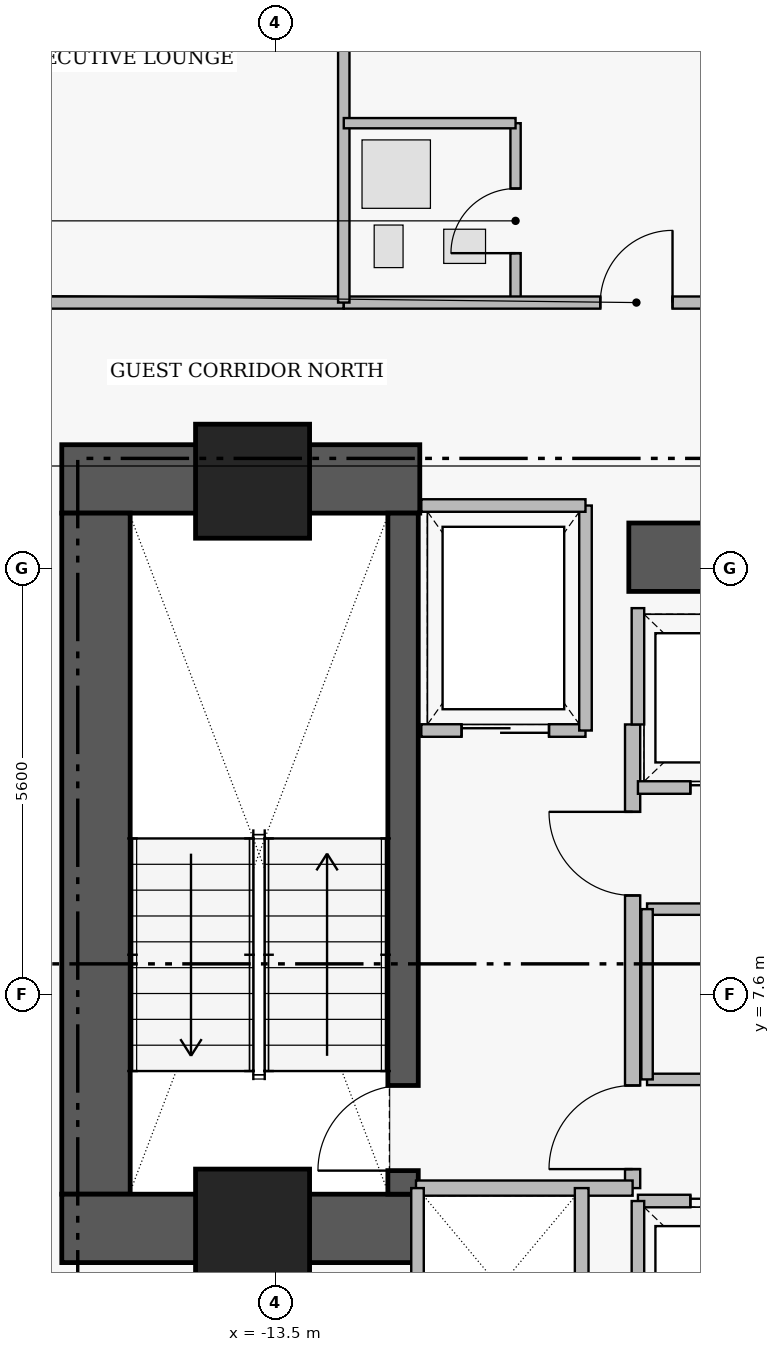
"""IFC4 building model, lengths in metres.
Left out: names, types, materials, properties, quantities, classifications, styles, units other than length and angle.
Written with IfcOpenShell. Run it as: python <this file> out.ifc"""

import sys

from ifc_helpers import new_model, si_unit, direction, frame, frame_2d, origin, origin_2d, place, context, subcontext, project, spatial, rectangle, extrude, element, fill, save


model = new_model("IFC4")
c1 = context("Model", 3, precision=1e-05, world=origin(), true_north=direction((0.0, 1.0)))
c2 = subcontext(c1, "Body", "Model", "MODEL_VIEW")
j1 = project(units=[si_unit("LENGTHUNIT", "METRE"), si_unit("PLANEANGLEUNIT", "RADIAN")], contexts=[c1])
p1 = place(None, origin())
s1 = spatial("IfcSite", under=j1, at=p1, CompositionType="ELEMENT")
p2 = place(p1, origin())
s2 = spatial("IfcBuilding", under=s1, at=p2, CompositionType="ELEMENT")
p3 = place(p2, frame((0.0, 0.0, 27.6)))
s3 = spatial("IfcBuildingStorey", under=s2, at=p3, CompositionType="ELEMENT", Elevation=27.6)
p4 = place(p3, frame((-16.31, 14.38, 0.0), z_axis=(0.0, 0.0, 1.0), x_axis=(1.0, 0.0, 0.0)))
e1 = element("IfcWall", 1, at=p4, inside=s3, PredefinedType="SHEAR", context=c2, shape_type="SweptSolid", body=[
    extrude(rectangle(XDim=4.71, YDim=0.9, at=frame_2d((2.355, 0.0))), origin(), (0.0, 0.0, 1.0), 3.46),
])
p5 = place(p3, frame((-15.86, 4.97, 0.0), z_axis=(0.0, 0.0, 1.0), x_axis=(0.0, 1.0, 0.0)))
e2 = element("IfcWall", 2, at=p5, inside=s3, PredefinedType="SHEAR", context=c2, shape_type="SweptSolid", body=[
    extrude(rectangle(XDim=8.96, YDim=0.9, at=frame_2d((4.48, 0.0))), origin(), (0.0, 0.0, 1.0), 3.46),
])
p6 = place(p3, frame((-16.31, 4.52, 0.0), z_axis=(0.0, 0.0, 1.0), x_axis=(1.0, 0.0, 0.0)))
e3 = element("IfcWall", 3, at=p6, inside=s3, PredefinedType="SHEAR", context=c2, shape_type="SweptSolid", body=[
    extrude(rectangle(XDim=4.71, YDim=0.9, at=frame_2d((2.355, 0.0))), origin(), (0.0, 0.0, 1.0), 3.46),
])
p7 = place(p3, frame((-8.85, 13.35, 0.0), z_axis=(0.0, 0.0, 1.0), x_axis=(1.0, 0.0, 0.0)))
e4 = element("IfcWall", 4, at=p7, inside=s3, PredefinedType="SHEAR", context=c2, shape_type="SweptSolid", body=[
    extrude(rectangle(XDim=7.6, YDim=0.9, at=frame_2d((3.8, 0.0))), origin(), (0.0, 0.0, 1.0), 3.43),
])
p8 = place(p3, frame((-11.82, 4.97, 0.0), z_axis=(0.0, 0.0, 1.0), x_axis=(0.0, 1.0, 0.0)))
e5 = element("IfcWall", 5, at=p8, inside=s3, PredefinedType="SHEAR", context=c2, shape_type="SweptSolid", body=[
    extrude(rectangle(XDim=8.96, YDim=0.4, at=frame_2d((4.48, 0.0))), origin(), (0.0, 0.0, 1.0), 3.46),
])
p9 = place(p8, frame((0.31, 0.0, 0.0)))
e6 = element("IfcOpeningElement", 6, at=p9, cuts=e5, PredefinedType="OPENING", context=c2, shape_type="SweptSolid", body=[
    extrude(rectangle(XDim=1.12, YDim=2.22, at=frame_2d((0.56, 1.11))), frame((0.0, 0.21, 0.0), z_axis=(0.0, -1.0, 0.0), x_axis=(1.0, 0.0, 0.0)), (0.0, 0.0, 1.0), 0.42),
])
for number, where, z_axis, x_axis in (
    (7, (-13.8, 14.35, 0.0), (0.0, 0.0, 1.0), (1.0, 0.0, 0.0)),
    (8, (-13.8, 4.55, 0.0), (0.0, 0.0, 1.0), (1.0, 0.0, 0.0)),
):
    element("IfcColumn", number, at=place(p3, frame(where, z_axis=z_axis, x_axis=x_axis)), inside=s3, PredefinedType="COLUMN", context=c2, shape_type="SweptSolid", body=[
        extrude(rectangle(XDim=1.5, YDim=1.5, at=origin_2d()), origin(), (0.0, 0.0, 1.0), 3.65),
    ])
p10 = place(p3, frame((-8.8, 5.05, 0.0), z_axis=(0.0, 0.0, 1.0), x_axis=(0.0, 1.0, 0.0)))
e9 = element("IfcWall", 9, at=p10, inside=s3, PredefinedType="PARTITIONING", context=c2, shape_type="SweptSolid", body=[
    extrude(rectangle(XDim=6.1, YDim=0.2, at=frame_2d((3.05, 0.0))), origin(), (0.0, 0.0, 1.0), 3.43),
])
p11 = place(p10, frame((0.25, 0.0, 0.0)))
e10 = element("IfcOpeningElement", 10, at=p11, cuts=e9, PredefinedType="OPENING", context=c2, shape_type="SweptSolid", body=[
    extrude(rectangle(XDim=1.1, YDim=2.2, at=frame_2d((0.55, 1.1))), frame((0.0, 0.11, 0.0), z_axis=(0.0, -1.0, 0.0), x_axis=(1.0, 0.0, 0.0)), (0.0, 0.0, 1.0), 0.22),
])
p12 = place(p10, frame((3.85, 0.0, 0.0)))
e11 = element("IfcOpeningElement", 11, at=p12, cuts=e9, PredefinedType="OPENING", context=c2, shape_type="SweptSolid", body=[
    extrude(rectangle(XDim=1.1, YDim=2.2, at=frame_2d((0.55, 1.1))), frame((0.0, 0.11, 0.0), z_axis=(0.0, -1.0, 0.0), x_axis=(1.0, 0.0, 0.0)), (0.0, 0.0, 1.0), 0.22),
])
p13 = place(p3, frame((-11.58, 11.07, 0.0), z_axis=(0.0, 0.0, 1.0), x_axis=(1.0, 0.0, 0.0)))
e12 = element("IfcWall", 12, at=p13, inside=s3, PredefinedType="PARTITIONING", context=c2, shape_type="SweptSolid", body=[
    extrude(rectangle(XDim=2.16, YDim=0.165, at=frame_2d((1.08, 0.0))), origin(), (0.0, 0.0, 1.0), 3.43),
])
p14 = place(p13, frame((0.53, 0.0, 0.0)))
e13 = element("IfcOpeningElement", 13, at=p14, cuts=e12, PredefinedType="OPENING", context=c2, shape_type="SweptSolid", body=[
    extrude(rectangle(XDim=1.15, YDim=2.25, at=frame_2d((0.575, 1.125))), frame((0.0, 0.093, 0.0), z_axis=(0.0, -1.0, 0.0), x_axis=(1.0, 0.0, 0.0)), (0.0, 0.0, 1.0), 0.185),
])
p15 = place(p3, frame((-8.73, 4.88, 0.0), z_axis=(0.0, 0.0, 1.0), x_axis=(1.0, 0.0, 0.0)))
e14 = element("IfcWall", 14, at=p15, inside=s3, PredefinedType="PARTITIONING", context=c2, shape_type="SweptSolid", body=[
    extrude(rectangle(XDim=2.48, YDim=0.165, at=frame_2d((1.24, 0.0))), origin(), (0.0, 0.0, 1.0), 3.43),
])
p16 = place(p15, frame((0.69, 0.0, 0.0)))
e15 = element("IfcOpeningElement", 15, at=p16, cuts=e14, PredefinedType="OPENING", context=c2, shape_type="SweptSolid", body=[
    extrude(rectangle(XDim=1.1, YDim=2.25, at=frame_2d((0.55, 1.125))), frame((0.0, 0.093, 0.0), z_axis=(0.0, -1.0, 0.0), x_axis=(1.0, 0.0, 0.0)), (0.0, 0.0, 1.0), 0.185),
])
p17 = place(p3, frame((-8.73, 10.32, 0.0), z_axis=(0.0, 0.0, 1.0), x_axis=(1.0, 0.0, 0.0)))
e16 = element("IfcWall", 16, at=p17, inside=s3, PredefinedType="PARTITIONING", context=c2, shape_type="SweptSolid", body=[
    extrude(rectangle(XDim=2.48, YDim=0.165, at=frame_2d((1.24, 0.0))), origin(), (0.0, 0.0, 1.0), 3.43),
])
p18 = place(p17, frame((0.69, 0.0, 0.0)))
e17 = element("IfcOpeningElement", 17, at=p18, cuts=e16, PredefinedType="OPENING", context=c2, shape_type="SweptSolid", body=[
    extrude(rectangle(XDim=1.1, YDim=2.25, at=frame_2d((0.55, 1.125))), frame((0.0, 0.093, 0.0), z_axis=(0.0, -1.0, 0.0), x_axis=(1.0, 0.0, 0.0)), (0.0, 0.0, 1.0), 0.185),
])
p19 = place(p3, frame((-8.61, 8.72, 0.0), z_axis=(0.0, 0.0, 1.0), x_axis=(1.0, 0.0, 0.0)))
e18 = element("IfcWall", 18, at=p19, inside=s3, PredefinedType="PARTITIONING", context=c2, shape_type="SweptSolid", body=[
    extrude(rectangle(XDim=2.92, YDim=0.15, at=frame_2d((1.46, 0.0))), origin(), (0.0, 0.0, 1.0), 3.43),
])
p20 = place(p19, frame((1.01, 0.0, 0.0)))
e19 = element("IfcOpeningElement", 19, at=p20, cuts=e18, PredefinedType="OPENING", context=c2, shape_type="SweptSolid", body=[
    extrude(rectangle(XDim=0.9, YDim=2.15, at=frame_2d((0.45, 1.075))), frame((0.0, 0.085, 0.0), z_axis=(0.0, -1.0, 0.0), x_axis=(1.0, 0.0, 0.0)), (0.0, 0.0, 1.0), 0.17),
])
p21 = place(p3, frame((-25.64, 16.7, 0.0), z_axis=(0.0, 0.0, 1.0), x_axis=(1.0, 0.0, 0.0)))
e20 = element("IfcWall", 20, at=p21, inside=s3, PredefinedType="PARTITIONING", context=c2, shape_type="SweptSolid", body=[
    extrude(rectangle(XDim=13.04, YDim=0.16, at=frame_2d((6.52, 0.0))), origin(), (0.0, 0.0, 1.0), 2.973),
])
p22 = place(p21, frame((5.98, 0.0, 0.0)))
e21 = element("IfcOpeningElement", 21, at=p22, cuts=e20, PredefinedType="OPENING", context=c2, shape_type="SweptSolid", body=[
    extrude(rectangle(XDim=1.08, YDim=2.18, at=frame_2d((0.54, 1.09))), frame((0.0, 0.09, 0.0), z_axis=(0.0, -1.0, 0.0), x_axis=(1.0, 0.0, 0.0)), (0.0, 0.0, 1.0), 0.18),
])
p23 = place(p3, frame((-10.34, 16.7, 0.0), z_axis=(0.0, 0.0, 1.0), x_axis=(0.0, 1.0, 0.0)))
e22 = element("IfcWall", 22, at=p23, inside=s3, PredefinedType="PLUMBINGWALL", context=c2, shape_type="SweptSolid", body=[
    extrude(rectangle(XDim=2.36, YDim=0.135, at=frame_2d((1.18, 0.0))), origin(), (0.0, 0.0, 1.0), 3.43),
])
p24 = place(p23, frame((0.65, 0.0, 0.0)))
e23 = element("IfcOpeningElement", 23, at=p24, cuts=e22, PredefinedType="OPENING", context=c2, shape_type="SweptSolid", body=[
    extrude(rectangle(XDim=0.85, YDim=2.1, at=frame_2d((0.425, 1.05))), frame((0.0, 0.077, 0.0), z_axis=(0.0, -1.0, 0.0), x_axis=(1.0, 0.0, 0.0)), (0.0, 0.0, 1.0), 0.155),
])
p25 = place(p3, frame((-12.6, 16.7, 0.0), z_axis=(0.0, 0.0, 1.0), x_axis=(1.0, 0.0, 0.0)))
e24 = element("IfcWall", 24, at=p25, inside=s3, PredefinedType="PARTITIONING", context=c2, shape_type="SweptSolid", body=[
    extrude(rectangle(XDim=5.4, YDim=0.16, at=frame_2d((2.7, 0.0))), origin(), (0.0, 0.0, 1.0), 2.973),
])
p26 = place(p25, frame((3.375, 0.0, 0.0)))
e25 = element("IfcOpeningElement", 25, at=p26, cuts=e24, PredefinedType="OPENING", context=c2, shape_type="SweptSolid", body=[
    extrude(rectangle(XDim=0.95, YDim=2.15, at=frame_2d((0.475, 1.075))), frame((0.0, 0.09, 0.0), z_axis=(0.0, -1.0, 0.0), x_axis=(1.0, 0.0, 0.0)), (0.0, 0.0, 1.0), 0.18),
])
p27 = place(p3, frame((-11.65, 5.05, 0.0), z_axis=(0.0, 0.0, 1.0), x_axis=(1.0, 0.0, 0.0)))
e26 = element("IfcWall", 26, at=p27, inside=s3, PredefinedType="PARTITIONING", context=c2, shape_type="SweptSolid", body=[
    extrude(rectangle(XDim=2.85, YDim=0.2, at=frame_2d((1.425, 0.0))), origin(), (0.0, 0.0, 1.0), 3.43),
])
p28 = place(p3, frame((-9.42, 11.07, 0.0), z_axis=(0.0, 0.0, 1.0), x_axis=(0.0, 1.0, 0.0)))
e27 = element("IfcWall", 27, at=p28, inside=s3, PredefinedType="PARTITIONING", context=c2, shape_type="SweptSolid", body=[
    extrude(rectangle(XDim=2.96, YDim=0.165, at=frame_2d((1.48, 0.0))), origin(), (0.0, 0.0, 1.0), 3.43),
])
p29 = place(p3, frame((-11.58, 14.03, 0.0), z_axis=(0.0, 0.0, 1.0), x_axis=(1.0, 0.0, 0.0)))
e28 = element("IfcWall", 28, at=p29, inside=s3, PredefinedType="PARTITIONING", context=c2, shape_type="SweptSolid", body=[
    extrude(rectangle(XDim=2.16, YDim=0.165, at=frame_2d((1.08, 0.0))), origin(), (0.0, 0.0, 1.0), 3.43),
])
p30 = place(p3, frame((-8.73, 2.52, 0.0), z_axis=(0.0, 0.0, 1.0), x_axis=(0.0, 1.0, 0.0)))
e29 = element("IfcWall", 29, at=p30, inside=s3, PredefinedType="PARTITIONING", context=c2, shape_type="SweptSolid", body=[
    extrude(rectangle(XDim=2.36, YDim=0.165, at=frame_2d((1.18, 0.0))), origin(), (0.0, 0.0, 1.0), 3.43),
])
p31 = place(p3, frame((-8.73, 11.15, 0.0), z_axis=(0.0, 0.0, 1.0), x_axis=(0.0, 1.0, 0.0)))
e30 = element("IfcWall", 30, at=p31, inside=s3, PredefinedType="PARTITIONING", context=c2, shape_type="SweptSolid", body=[
    extrude(rectangle(XDim=1.53, YDim=0.165, at=frame_2d((0.765, 0.0))), origin(), (0.0, 0.0, 1.0), 3.43),
])
p32 = place(p3, frame((-9.47, 2.45, 0.0), z_axis=(0.0, 0.0, 1.0), x_axis=(0.0, 1.0, 0.0)))
e31 = element("IfcWall", 31, at=p32, inside=s3, PredefinedType="PARTITIONING", context=c2, shape_type="SweptSolid", body=[
    extrude(rectangle(XDim=2.6, YDim=0.18, at=frame_2d((1.3, 0.0))), origin(), (0.0, 0.0, 1.0), 3.43),
])
p33 = place(p3, frame((-11.63, 2.47, 0.0), z_axis=(0.0, 0.0, 1.0), x_axis=(0.0, 1.0, 0.0)))
e32 = element("IfcWall", 32, at=p33, inside=s3, PredefinedType="PARTITIONING", context=c2, shape_type="SweptSolid", body=[
    extrude(rectangle(XDim=2.58, YDim=0.165, at=frame_2d((1.29, 0.0))), origin(), (0.0, 0.0, 1.0), 3.43),
])
p34 = place(p3, frame((-8.61, 6.48, 0.0), z_axis=(0.0, 0.0, 1.0), x_axis=(1.0, 0.0, 0.0)))
e33 = element("IfcWall", 33, at=p34, inside=s3, PredefinedType="PARTITIONING", context=c2, shape_type="SweptSolid", body=[
    extrude(rectangle(XDim=2.92, YDim=0.15, at=frame_2d((1.46, 0.0))), origin(), (0.0, 0.0, 1.0), 3.43),
])
p35 = place(p3, frame((-8.61, 6.48, 0.0), z_axis=(0.0, 0.0, 1.0), x_axis=(0.0, 1.0, 0.0)))
e34 = element("IfcWall", 34, at=p35, inside=s3, PredefinedType="PARTITIONING", context=c2, shape_type="SweptSolid", body=[
    extrude(rectangle(XDim=2.24, YDim=0.15, at=frame_2d((1.12, 0.0))), origin(), (0.0, 0.0, 1.0), 3.43),
])
p36 = place(p3, frame((-12.6, 16.7, 0.0), z_axis=(0.0, 0.0, 1.0), x_axis=(0.0, 1.0, 0.0)))
e35 = element("IfcWall", 35, at=p36, inside=s3, PredefinedType="PARTITIONING", context=c2, shape_type="SweptSolid", body=[
    extrude(rectangle(XDim=6.34, YDim=0.15, at=frame_2d((3.17, 0.0))), origin(), (0.0, 0.0, 1.0), 3.43),
])
p37 = place(p3, frame((-12.6, 19.06, 0.0), z_axis=(0.0, 0.0, 1.0), x_axis=(1.0, 0.0, 0.0)))
e36 = element("IfcWall", 36, at=p37, inside=s3, PredefinedType="PLUMBINGWALL", context=c2, shape_type="SweptSolid", body=[
    extrude(rectangle(XDim=2.26, YDim=0.135, at=frame_2d((1.13, 0.0))), origin(), (0.0, 0.0, 1.0), 2.973),
])
p38 = place(p9, origin())
e37 = element("IfcDoor", 37, at=p38, inside=s3, OperationType="SINGLE_SWING_LEFT", PredefinedType="DOOR", context=c2, shape_type="SweptSolid", body=[
    extrude(rectangle(XDim=1.12, YDim=2.22, at=frame_2d((0.56, 1.11))), frame((0.0, 0.025, 0.0), z_axis=(0.0, -1.0, 0.0), x_axis=(1.0, 0.0, 0.0)), (0.0, 0.0, 1.0), 0.05),
])
fill(e6, e37)
p39 = place(p11, origin())
e38 = element("IfcDoor", 38, at=p39, inside=s3, OperationType="SINGLE_SWING_LEFT", PredefinedType="DOOR", context=c2, shape_type="SweptSolid", body=[
    extrude(rectangle(XDim=1.1, YDim=2.2, at=frame_2d((0.55, 1.1))), frame((0.0, 0.025, 0.0), z_axis=(0.0, -1.0, 0.0), x_axis=(1.0, 0.0, 0.0)), (0.0, 0.0, 1.0), 0.05),
])
fill(e10, e38)
p40 = place(p12, origin())
e39 = element("IfcDoor", 39, at=p40, inside=s3, OperationType="SINGLE_SWING_RIGHT", PredefinedType="DOOR", context=c2, shape_type="SweptSolid", body=[
    extrude(rectangle(XDim=1.1, YDim=2.2, at=frame_2d((0.55, 1.1))), frame((0.0, 0.025, 0.0), z_axis=(0.0, -1.0, 0.0), x_axis=(1.0, 0.0, 0.0)), (0.0, 0.0, 1.0), 0.05),
])
fill(e11, e39)
p41 = place(p14, origin())
e40 = element("IfcDoor", 40, at=p41, inside=s3, OperationType="SLIDING_TO_LEFT", PredefinedType="DOOR", context=c2, shape_type="SweptSolid", body=[
    extrude(rectangle(XDim=1.15, YDim=2.25, at=frame_2d((0.575, 1.125))), frame((0.0, 0.025, 0.0), z_axis=(0.0, -1.0, 0.0), x_axis=(1.0, 0.0, 0.0)), (0.0, 0.0, 1.0), 0.05),
])
fill(e13, e40)
p42 = place(p16, origin())
e41 = element("IfcDoor", 41, at=p42, inside=s3, OperationType="SLIDING_TO_LEFT", PredefinedType="DOOR", context=c2, shape_type="SweptSolid", body=[
    extrude(rectangle(XDim=1.1, YDim=2.25, at=frame_2d((0.55, 1.125))), frame((0.0, 0.025, 0.0), z_axis=(0.0, -1.0, 0.0), x_axis=(1.0, 0.0, 0.0)), (0.0, 0.0, 1.0), 0.05),
])
fill(e15, e41)
p43 = place(p18, origin())
e42 = element("IfcDoor", 42, at=p43, inside=s3, OperationType="SLIDING_TO_LEFT", PredefinedType="DOOR", context=c2, shape_type="SweptSolid", body=[
    extrude(rectangle(XDim=1.1, YDim=2.25, at=frame_2d((0.55, 1.125))), frame((0.0, 0.025, 0.0), z_axis=(0.0, -1.0, 0.0), x_axis=(1.0, 0.0, 0.0)), (0.0, 0.0, 1.0), 0.05),
])
fill(e17, e42)
p44 = place(p24, origin())
e43 = element("IfcDoor", 43, at=p44, inside=s3, OperationType="SINGLE_SWING_LEFT", PredefinedType="DOOR", context=c2, shape_type="SweptSolid", body=[
    extrude(rectangle(XDim=0.85, YDim=2.1, at=frame_2d((0.425, 1.05))), frame((0.0, 0.025, 0.0), z_axis=(0.0, -1.0, 0.0), x_axis=(1.0, 0.0, 0.0)), (0.0, 0.0, 1.0), 0.05),
])
fill(e23, e43)
p45 = place(p26, origin())
e44 = element("IfcDoor", 44, at=p45, inside=s3, OperationType="SINGLE_SWING_RIGHT", PredefinedType="DOOR", context=c2, shape_type="SweptSolid", body=[
    extrude(rectangle(XDim=0.95, YDim=2.15, at=frame_2d((0.475, 1.075))), frame((0.0, 0.025, 0.0), z_axis=(0.0, -1.0, 0.0), x_axis=(1.0, 0.0, 0.0)), (0.0, 0.0, 1.0), 0.05),
])
fill(e25, e44)
save(model, sys.argv[1])
